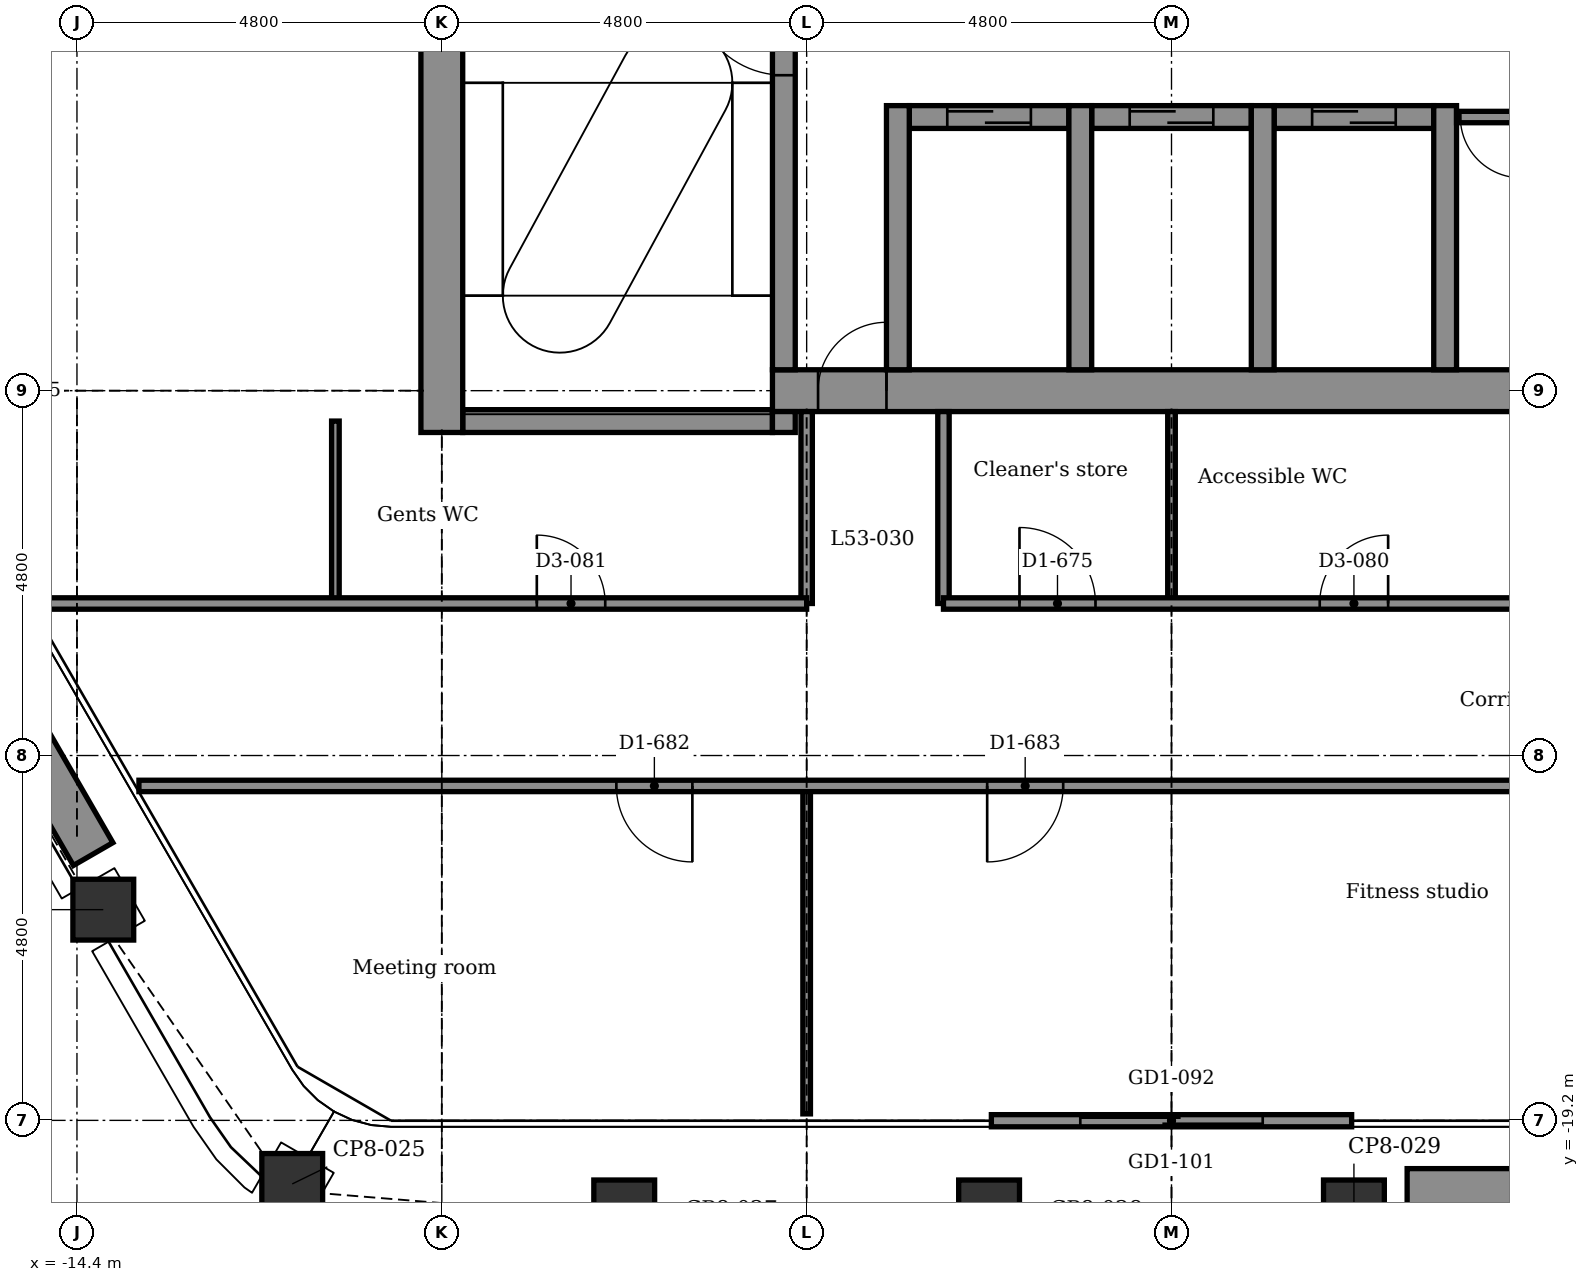
"""IFC4 building model, lengths in metres.
Left out: names, types, materials, properties, quantities, classifications, styles, units other than length and angle.
Written with IfcOpenShell. Run it as: python <this file> out.ifc"""

import sys

from ifc_helpers import new_model, si_unit, direction, frame, frame_2d, origin, origin_2d, place, context, subcontext, project, spatial, rectangle, extrude, element, fill, save


model = new_model("IFC4")
c1 = context("Model", 3, precision=1e-05, world=origin(), true_north=direction((0.0, 1.0)))
c2 = subcontext(c1, "Body", "Model", "MODEL_VIEW")
j1 = project(units=[si_unit("LENGTHUNIT", "METRE"), si_unit("PLANEANGLEUNIT", "RADIAN")], contexts=[c1])
p1 = place(None, origin())
s1 = spatial("IfcSite", under=j1, at=p1, CompositionType="ELEMENT")
p2 = place(p1, origin())
s2 = spatial("IfcBuilding", under=s1, at=p2, CompositionType="ELEMENT")
p3 = place(p2, frame((0.0, 0.0, 242.3)))
s3 = spatial("IfcBuildingStorey", under=s2, at=p3, CompositionType="ELEMENT", Elevation=242.3)
for number, where, z_axis, x_axis in (
    (1, (2.4, -20.385, -0.15), (0.0, 0.0, 1.0), (1.0, 0.0, 0.0)),
    (2, (-2.4, -20.385, -0.15), (0.0, 0.0, 1.0), (1.0, 0.0, 0.0)),
    (3, (-7.2, -20.385, -0.15), (0.0, 0.0, 1.0), (1.0, 0.0, 0.0)),
    (4, (-11.568, -20.036, -0.15), (0.0, 0.0, 1.0), (0.5, 0.866, 0.0)),
    (5, (-14.054, -16.428, -0.15), (0.0, 0.0, 1.0), (0.866, 0.5, 0.0)),
):
    element("IfcColumn", number, at=place(p3, frame(where, z_axis=z_axis, x_axis=x_axis)), inside=s3, PredefinedType="COLUMN", context=c2, shape_type="SweptSolid", body=[
        extrude(rectangle(XDim=0.8, YDim=0.8, at=origin_2d()), origin(), (0.0, 0.0, 1.0), 3.9),
    ])
p4 = place(p3, frame((-9.325, -10.0, -0.15), z_axis=(0.0, 0.0, 1.0), x_axis=(1.0, 0.0, 0.0)))
e6 = element("IfcWall", 6, at=p4, inside=s3, PredefinedType="STANDARD", context=c2, shape_type="SweptSolid", body=[
    extrude(rectangle(XDim=4.075, YDim=0.3, at=frame_2d((2.038, 0.0))), origin(), (0.0, 0.0, 1.0), 3.9),
])
p5 = place(p3, frame((-5.25, -9.6, -0.15), z_axis=(0.0, 0.0, 1.0), x_axis=(1.0, 0.0, 0.0)))
e7 = element("IfcWall", 7, at=p5, inside=s3, PredefinedType="SHEAR", context=c2, shape_type="SweptSolid", body=[
    extrude(rectangle(XDim=10.2, YDim=0.55, at=frame_2d((5.1, 0.0))), origin(), (0.0, 0.0, 1.0), 3.9),
])
p6 = place(p5, frame((0.6, 0.0, 0.15)))
e8 = element("IfcOpeningElement", 8, at=p6, cuts=e7, PredefinedType="OPENING", context=c2, shape_type="SweptSolid", body=[
    extrude(rectangle(XDim=0.9, YDim=2.1, at=frame_2d((0.45, 1.05))), frame((0.0, 0.285, 0.0), z_axis=(0.0, -1.0, 0.0), x_axis=(1.0, 0.0, 0.0)), (0.0, 0.0, 1.0), 0.57),
])
p7 = place(p3, frame((-3.45, -6.0, -0.15), z_axis=(0.0, 0.0, 1.0), x_axis=(1.0, 0.0, 0.0)))
e9 = element("IfcWall", 9, at=p7, inside=s3, PredefinedType="STANDARD", context=c2, shape_type="SweptSolid", body=[
    extrude(rectangle(XDim=2.1, YDim=0.3, at=frame_2d((1.05, 0.0))), origin(), (0.0, 0.0, 1.0), 3.9),
])
p8 = place(p7, frame((0.5, 0.0, 0.15)))
e10 = element("IfcOpeningElement", 10, at=p8, cuts=e9, PredefinedType="OPENING", context=c2, shape_type="SweptSolid", body=[
    extrude(rectangle(XDim=1.1, YDim=2.1, at=frame_2d((0.55, 1.05))), frame((0.0, 0.16, 0.0), z_axis=(0.0, -1.0, 0.0), x_axis=(1.0, 0.0, 0.0)), (0.0, 0.0, 1.0), 0.32),
])
p9 = place(p3, frame((-1.05, -6.0, -0.15), z_axis=(0.0, 0.0, 1.0), x_axis=(1.0, 0.0, 0.0)))
e11 = element("IfcWall", 11, at=p9, inside=s3, PredefinedType="STANDARD", context=c2, shape_type="SweptSolid", body=[
    extrude(rectangle(XDim=2.1, YDim=0.3, at=frame_2d((1.05, 0.0))), origin(), (0.0, 0.0, 1.0), 3.9),
])
p10 = place(p9, frame((0.5, 0.0, 0.15)))
e12 = element("IfcOpeningElement", 12, at=p10, cuts=e11, PredefinedType="OPENING", context=c2, shape_type="SweptSolid", body=[
    extrude(rectangle(XDim=1.1, YDim=2.1, at=frame_2d((0.55, 1.05))), frame((0.0, 0.16, 0.0), z_axis=(0.0, -1.0, 0.0), x_axis=(1.0, 0.0, 0.0)), (0.0, 0.0, 1.0), 0.32),
])
p11 = place(p3, frame((1.35, -6.0, -0.15), z_axis=(0.0, 0.0, 1.0), x_axis=(1.0, 0.0, 0.0)))
e13 = element("IfcWall", 13, at=p11, inside=s3, PredefinedType="STANDARD", context=c2, shape_type="SweptSolid", body=[
    extrude(rectangle(XDim=2.1, YDim=0.3, at=frame_2d((1.05, 0.0))), origin(), (0.0, 0.0, 1.0), 3.9),
])
p12 = place(p11, frame((0.5, 0.0, 0.15)))
e14 = element("IfcOpeningElement", 14, at=p12, cuts=e13, PredefinedType="OPENING", context=c2, shape_type="SweptSolid", body=[
    extrude(rectangle(XDim=1.1, YDim=2.1, at=frame_2d((0.55, 1.05))), frame((0.0, 0.16, 0.0), z_axis=(0.0, -1.0, 0.0), x_axis=(1.0, 0.0, 0.0)), (0.0, 0.0, 1.0), 0.32),
])
p13 = place(p3, frame((-9.6, -10.15, -0.15), z_axis=(0.0, 0.0, 1.0), x_axis=(0.0, 1.0, 0.0)))
e15 = element("IfcWall", 15, at=p13, inside=s3, PredefinedType="SHEAR", context=c2, shape_type="SweptSolid", body=[
    extrude(rectangle(XDim=7.6, YDim=0.55, at=frame_2d((3.8, 0.0))), origin(), (0.0, 0.0, 1.0), 3.9),
])
p14 = place(p3, frame((-5.1, -10.15, -0.15), z_axis=(0.0, 0.0, 1.0), x_axis=(0.0, 1.0, 0.0)))
e16 = element("IfcWall", 16, at=p14, inside=s3, PredefinedType="STANDARD", context=c2, shape_type="SweptSolid", body=[
    extrude(rectangle(XDim=0.275, YDim=0.3, at=frame_2d((0.137, 0.0))), origin(), (0.0, 0.0, 1.0), 3.9),
])
p15 = place(p3, frame((-5.1, -9.325, -0.15), z_axis=(0.0, 0.0, 1.0), x_axis=(0.0, 1.0, 0.0)))
e17 = element("IfcWall", 17, at=p15, inside=s3, PredefinedType="STANDARD", context=c2, shape_type="SweptSolid", body=[
    extrude(rectangle(XDim=7.075, YDim=0.3, at=frame_2d((3.538, 0.0))), origin(), (0.0, 0.0, 1.0), 3.9),
])
p16 = place(p15, frame((3.875, 0.0, 0.15)))
e18 = element("IfcOpeningElement", 18, at=p16, cuts=e17, PredefinedType="OPENING", context=c2, shape_type="SweptSolid", body=[
    extrude(rectangle(XDim=1.2, YDim=2.1, at=frame_2d((0.6, 1.05))), frame((0.0, 0.16, 0.0), z_axis=(0.0, -1.0, 0.0), x_axis=(1.0, 0.0, 0.0)), (0.0, 0.0, 1.0), 0.32),
])
for number, where, z_axis, x_axis in (
    (19, (-3.6, -9.325, -0.15), (0.0, 0.0, 1.0), (0.0, 1.0, 0.0)),
    (20, (-1.2, -9.325, -0.15), (0.0, 0.0, 1.0), (0.0, 1.0, 0.0)),
    (21, (1.2, -9.325, -0.15), (0.0, 0.0, 1.0), (0.0, 1.0, 0.0)),
    (22, (3.6, -9.325, -0.15), (0.0, 0.0, 1.0), (0.0, 1.0, 0.0)),
):
    element("IfcWall", number, at=place(p3, frame(where, z_axis=z_axis, x_axis=x_axis)), inside=s3, PredefinedType="STANDARD", context=c2, shape_type="SweptSolid", body=[
        extrude(rectangle(XDim=3.475, YDim=0.3, at=frame_2d((1.737, 0.0))), origin(), (0.0, 0.0, 1.0), 3.9),
    ])
p17 = place(p3, frame((2.37, -19.205, 0.0), z_axis=(0.0, 0.0, 1.0), x_axis=(-1.0, 0.0, 0.0)))
e23 = element("IfcWall", 23, at=p17, inside=s3, PredefinedType="PARTITIONING", context=c2, shape_type="SweptSolid", body=[
    extrude(rectangle(XDim=4.74, YDim=0.16, at=frame_2d((2.37, 0.0))), origin(), (0.0, 0.0, 1.0), 3.75),
])
p18 = place(p17, frame((1.17, 0.0, 0.0)))
e24 = element("IfcOpeningElement", 24, at=p18, cuts=e23, PredefinedType="OPENING", context=c2, shape_type="SweptSolid", body=[
    extrude(rectangle(XDim=2.4, YDim=2.4, at=frame_2d((1.2, 1.2))), frame((0.0, 0.09, 0.0), z_axis=(0.0, -1.0, 0.0), x_axis=(1.0, 0.0, 0.0)), (0.0, 0.0, 1.0), 0.18),
])
p19 = place(p3, frame((6.5, -20.135, 0.0), z_axis=(0.0, 0.0, 1.0), x_axis=(-1.0, 0.0, 0.0)))
e25 = element("IfcWall", 25, at=p19, inside=s3, PredefinedType="USERDEFINED", context=c2, shape_type="SweptSolid", body=[
    extrude(rectangle(XDim=3.4, YDim=0.6, at=frame_2d((1.7, 0.0))), origin(), (0.0, 0.0, 1.0), 0.7),
])
p20 = place(p3, frame((-14.187, -15.697, 0.0), z_axis=(0.0, 0.0, 1.0), x_axis=(-0.499977295307, 0.866038511948, 0.0)))
e26 = element("IfcWall", 26, at=p20, inside=s3, PredefinedType="USERDEFINED", context=c2, shape_type="SweptSolid", body=[
    extrude(rectangle(XDim=3.4, YDim=0.6, at=frame_2d((1.7, 0.0))), origin(), (0.0, 0.0, 1.0), 0.7),
])
p21 = place(p3, frame((0.0, -12.4, 0.0), z_axis=(0.0, 0.0, 1.0), x_axis=(0.0, 1.0, 0.0)))
e27 = element("IfcWall", 27, at=p21, inside=s3, PredefinedType="PARTITIONING", context=c2, shape_type="SweptSolid", body=[
    extrude(rectangle(XDim=2.525, YDim=0.1, at=frame_2d((1.262, 0.0))), origin(), (0.0, 0.0, 1.0), 3.217),
])
p22 = place(p3, frame((-3.0, -12.4, 0.0), z_axis=(0.0, 0.0, 1.0), x_axis=(0.0, 1.0, 0.0)))
e28 = element("IfcWall", 28, at=p22, inside=s3, PredefinedType="PARTITIONING", context=c2, shape_type="SweptSolid", body=[
    extrude(rectangle(XDim=2.525, YDim=0.15, at=frame_2d((1.262, 0.0))), origin(), (0.0, 0.0, 1.0), 3.75),
])
p23 = place(p3, frame((-4.8, -19.115, 0.0), z_axis=(0.0, 0.0, 1.0), x_axis=(0.0, 1.0, 0.0)))
e29 = element("IfcWall", 29, at=p23, inside=s3, PredefinedType="PARTITIONING", context=c2, shape_type="SweptSolid", body=[
    extrude(rectangle(XDim=4.314, YDim=0.1, at=frame_2d((2.157, 0.0))), origin(), (0.0, 0.0, 1.0), 3.217),
])
p24 = place(p3, frame((-4.8, -12.4, 0.0), z_axis=(0.0, 0.0, 1.0), x_axis=(0.0, 1.0, 0.0)))
e30 = element("IfcWall", 30, at=p24, inside=s3, PredefinedType="PARTITIONING", context=c2, shape_type="SweptSolid", body=[
    extrude(rectangle(XDim=2.525, YDim=0.15, at=frame_2d((1.262, 0.0))), origin(), (0.0, 0.0, 1.0), 3.217),
])
p25 = place(p3, frame((-11.0, -12.4, 0.0), z_axis=(0.0, 0.0, 1.0), x_axis=(0.0, 1.0, 0.0)))
e31 = element("IfcWall", 31, at=p25, inside=s3, PredefinedType="PARTITIONING", context=c2, shape_type="SweptSolid", body=[
    extrude(rectangle(XDim=2.4, YDim=0.1, at=frame_2d((1.2, 0.0))), origin(), (0.0, 0.0, 1.0), 3.75),
])
p26 = place(p3, frame((-13.585, -14.8, 0.0), z_axis=(0.0, 0.0, 1.0), x_axis=(1.0, 0.0, 0.0)))
e32 = element("IfcWall", 32, at=p26, inside=s3, PredefinedType="PARTITIONING", context=c2, shape_type="SweptSolid", body=[
    extrude(rectangle(XDim=27.169, YDim=0.15, at=frame_2d((13.585, 0.0))), origin(), (0.0, 0.0, 1.0), 3.75),
])
p27 = place(p26, frame((6.281, 0.0, 0.0)))
e33 = element("IfcOpeningElement", 33, at=p27, cuts=e32, PredefinedType="OPENING", context=c2, shape_type="SweptSolid", body=[
    extrude(rectangle(XDim=1.0, YDim=2.1, at=frame_2d((0.5, 1.05))), frame((0.0, 0.085, 0.0), z_axis=(0.0, -1.0, 0.0), x_axis=(1.0, 0.0, 0.0)), (0.0, 0.0, 1.0), 0.17),
])
p28 = place(p26, frame((11.16, 0.0, 0.0)))
e34 = element("IfcOpeningElement", 34, at=p28, cuts=e32, PredefinedType="OPENING", context=c2, shape_type="SweptSolid", body=[
    extrude(rectangle(XDim=1.0, YDim=2.1, at=frame_2d((0.5, 1.05))), frame((0.0, 0.085, 0.0), z_axis=(0.0, -1.0, 0.0), x_axis=(1.0, 0.0, 0.0)), (0.0, 0.0, 1.0), 0.17),
])
p29 = place(p26, frame((20.285, 0.0, 0.0)))
e35 = element("IfcOpeningElement", 35, at=p29, cuts=e32, PredefinedType="OPENING", context=c2, shape_type="SweptSolid", body=[
    extrude(rectangle(XDim=1.0, YDim=2.1, at=frame_2d((0.5, 1.05))), frame((0.0, 0.085, 0.0), z_axis=(0.0, -1.0, 0.0), x_axis=(1.0, 0.0, 0.0)), (0.0, 0.0, 1.0), 0.17),
])
p30 = place(p26, frame((24.368, 0.0, 0.0)))
e36 = element("IfcOpeningElement", 36, at=p30, cuts=e32, PredefinedType="OPENING", context=c2, shape_type="SweptSolid", body=[
    extrude(rectangle(XDim=1.0, YDim=2.1, at=frame_2d((0.5, 1.05))), frame((0.0, 0.085, 0.0), z_axis=(0.0, -1.0, 0.0), x_axis=(1.0, 0.0, 0.0)), (0.0, 0.0, 1.0), 0.17),
])
p31 = place(p3, frame((-14.97, -12.4, 0.0), z_axis=(0.0, 0.0, 1.0), x_axis=(1.0, 0.0, 0.0)))
e37 = element("IfcWall", 37, at=p31, inside=s3, PredefinedType="PARTITIONING", context=c2, shape_type="SweptSolid", body=[
    extrude(rectangle(XDim=10.17, YDim=0.15, at=frame_2d((5.085, 0.0))), origin(), (0.0, 0.0, 1.0), 3.75),
])
p32 = place(p31, frame((6.62, 0.0, 0.0)))
e38 = element("IfcOpeningElement", 38, at=p32, cuts=e37, PredefinedType="OPENING", context=c2, shape_type="SweptSolid", body=[
    extrude(rectangle(XDim=0.9, YDim=2.1, at=frame_2d((0.45, 1.05))), frame((0.0, 0.085, 0.0), z_axis=(0.0, -1.0, 0.0), x_axis=(1.0, 0.0, 0.0)), (0.0, 0.0, 1.0), 0.17),
])
p33 = place(p3, frame((-3.0, -12.4, 0.0), z_axis=(0.0, 0.0, 1.0), x_axis=(1.0, 0.0, 0.0)))
e39 = element("IfcWall", 39, at=p33, inside=s3, PredefinedType="PARTITIONING", context=c2, shape_type="SweptSolid", body=[
    extrude(rectangle(XDim=17.97, YDim=0.15, at=frame_2d((8.985, 0.0))), origin(), (0.0, 0.0, 1.0), 3.75),
])
p34 = place(p33, frame((1.0, 0.0, 0.0)))
e40 = element("IfcOpeningElement", 40, at=p34, cuts=e39, PredefinedType="OPENING", context=c2, shape_type="SweptSolid", body=[
    extrude(rectangle(XDim=1.0, YDim=2.1, at=frame_2d((0.5, 1.05))), frame((0.0, 0.085, 0.0), z_axis=(0.0, -1.0, 0.0), x_axis=(1.0, 0.0, 0.0)), (0.0, 0.0, 1.0), 0.17),
])
p35 = place(p33, frame((4.95, 0.0, 0.0)))
e41 = element("IfcOpeningElement", 41, at=p35, cuts=e39, PredefinedType="OPENING", context=c2, shape_type="SweptSolid", body=[
    extrude(rectangle(XDim=0.9, YDim=2.1, at=frame_2d((0.45, 1.05))), frame((0.0, 0.085, 0.0), z_axis=(0.0, -1.0, 0.0), x_axis=(1.0, 0.0, 0.0)), (0.0, 0.0, 1.0), 0.17),
])
p36 = place(p33, frame((9.7, 0.0, 0.0)))
e42 = element("IfcOpeningElement", 42, at=p36, cuts=e39, PredefinedType="OPENING", context=c2, shape_type="SweptSolid", body=[
    extrude(rectangle(XDim=1.0, YDim=2.1, at=frame_2d((0.5, 1.05))), frame((0.0, 0.085, 0.0), z_axis=(0.0, -1.0, 0.0), x_axis=(1.0, 0.0, 0.0)), (0.0, 0.0, 1.0), 0.17),
])
p37 = place(p3, frame((3.75, -6.0, 0.0), z_axis=(0.0, 0.0, 1.0), x_axis=(1.0, 0.0, 0.0)))
e43 = element("IfcWall", 43, at=p37, inside=s3, PredefinedType="PARTITIONING", context=c2, shape_type="SweptSolid", body=[
    extrude(rectangle(XDim=0.9, YDim=0.15, at=frame_2d((0.45, 0.0))), origin(), (0.0, 0.0, 1.0), 3.75),
])
p38 = place(p37, frame((0.05, 0.0, 0.0)))
e44 = element("IfcOpeningElement", 44, at=p38, cuts=e43, PredefinedType="OPENING", context=c2, shape_type="SweptSolid", body=[
    extrude(rectangle(XDim=0.8, YDim=2.1, at=frame_2d((0.4, 1.05))), frame((0.0, 0.085, 0.0), z_axis=(0.0, -1.0, 0.0), x_axis=(1.0, 0.0, 0.0)), (0.0, 0.0, 1.0), 0.17),
])
p39 = place(p18, origin())
e45 = element("IfcDoor", 45, at=p39, inside=s3, OperationType="DOUBLE_DOOR_SLIDING", PredefinedType="DOOR", context=c2, shape_type="SweptSolid", body=[
    extrude(rectangle(XDim=2.4, YDim=2.4, at=frame_2d((1.2, 1.2))), frame((0.0, 0.025, 0.0), z_axis=(0.0, -1.0, 0.0), x_axis=(1.0, 0.0, 0.0)), (0.0, 0.0, 1.0), 0.05),
])
fill(e24, e45)
p40 = place(p38, frame((0.8, 0.0, 0.0), z_axis=(0.0, 0.0, 1.0), x_axis=(-1.0, 0.0, 0.0)))
e46 = element("IfcDoor", 46, at=p40, inside=s3, OperationType="SINGLE_SWING_RIGHT", PredefinedType="DOOR", context=c2, shape_type="SweptSolid", body=[
    extrude(rectangle(XDim=0.8, YDim=2.1, at=frame_2d((0.4, 1.05))), frame((0.0, 0.025, 0.0), z_axis=(0.0, -1.0, 0.0), x_axis=(1.0, 0.0, 0.0)), (0.0, 0.0, 1.0), 0.05),
])
fill(e44, e46)
p41 = place(p34, origin())
e47 = element("IfcDoor", 47, at=p41, inside=s3, OperationType="SINGLE_SWING_LEFT", PredefinedType="DOOR", context=c2, shape_type="SweptSolid", body=[
    extrude(rectangle(XDim=1.0, YDim=2.1, at=frame_2d((0.5, 1.05))), frame((0.0, 0.025, 0.0), z_axis=(0.0, -1.0, 0.0), x_axis=(1.0, 0.0, 0.0)), (0.0, 0.0, 1.0), 0.05),
])
fill(e40, e47)
p42 = place(p35, origin())
e48 = element("IfcDoor", 48, at=p42, inside=s3, OperationType="SINGLE_SWING_RIGHT", PredefinedType="DOOR", context=c2, shape_type="SweptSolid", body=[
    extrude(rectangle(XDim=0.9, YDim=2.1, at=frame_2d((0.45, 1.05))), frame((0.0, 0.025, 0.0), z_axis=(0.0, -1.0, 0.0), x_axis=(1.0, 0.0, 0.0)), (0.0, 0.0, 1.0), 0.05),
])
fill(e41, e48)
p43 = place(p32, origin())
e49 = element("IfcDoor", 49, at=p43, inside=s3, OperationType="SINGLE_SWING_LEFT", PredefinedType="DOOR", context=c2, shape_type="SweptSolid", body=[
    extrude(rectangle(XDim=0.9, YDim=2.1, at=frame_2d((0.45, 1.05))), frame((0.0, 0.025, 0.0), z_axis=(0.0, -1.0, 0.0), x_axis=(1.0, 0.0, 0.0)), (0.0, 0.0, 1.0), 0.05),
])
fill(e38, e49)
p44 = place(p27, frame((1.0, 0.0, 0.0), z_axis=(0.0, 0.0, 1.0), x_axis=(-1.0, 0.0, 0.0)))
e50 = element("IfcDoor", 50, at=p44, inside=s3, OperationType="SINGLE_SWING_RIGHT", PredefinedType="DOOR", context=c2, shape_type="SweptSolid", body=[
    extrude(rectangle(XDim=1.0, YDim=2.1, at=frame_2d((0.5, 1.05))), frame((0.0, 0.025, 0.0), z_axis=(0.0, -1.0, 0.0), x_axis=(1.0, 0.0, 0.0)), (0.0, 0.0, 1.0), 0.05),
])
fill(e33, e50)
p45 = place(p28, frame((1.0, 0.0, 0.0), z_axis=(0.0, 0.0, 1.0), x_axis=(-1.0, 0.0, 0.0)))
e51 = element("IfcDoor", 51, at=p45, inside=s3, OperationType="SINGLE_SWING_LEFT", PredefinedType="DOOR", context=c2, shape_type="SweptSolid", body=[
    extrude(rectangle(XDim=1.0, YDim=2.1, at=frame_2d((0.5, 1.05))), frame((0.0, 0.025, 0.0), z_axis=(0.0, -1.0, 0.0), x_axis=(1.0, 0.0, 0.0)), (0.0, 0.0, 1.0), 0.05),
])
fill(e34, e51)
p46 = place(p8, origin())
e52 = element("IfcDoor", 52, at=p46, inside=s3, OperationType="DOUBLE_DOOR_SLIDING", PredefinedType="DOOR", context=c2, shape_type="SweptSolid", body=[
    extrude(rectangle(XDim=1.1, YDim=2.1, at=frame_2d((0.55, 1.05))), frame((0.0, 0.025, 0.0), z_axis=(0.0, -1.0, 0.0), x_axis=(1.0, 0.0, 0.0)), (0.0, 0.0, 1.0), 0.05),
])
fill(e10, e52)
p47 = place(p10, origin())
e53 = element("IfcDoor", 53, at=p47, inside=s3, OperationType="DOUBLE_DOOR_SLIDING", PredefinedType="DOOR", context=c2, shape_type="SweptSolid", body=[
    extrude(rectangle(XDim=1.1, YDim=2.1, at=frame_2d((0.55, 1.05))), frame((0.0, 0.025, 0.0), z_axis=(0.0, -1.0, 0.0), x_axis=(1.0, 0.0, 0.0)), (0.0, 0.0, 1.0), 0.05),
])
fill(e12, e53)
p48 = place(p12, origin())
e54 = element("IfcDoor", 54, at=p48, inside=s3, OperationType="DOUBLE_DOOR_SLIDING", PredefinedType="DOOR", context=c2, shape_type="SweptSolid", body=[
    extrude(rectangle(XDim=1.1, YDim=2.1, at=frame_2d((0.55, 1.05))), frame((0.0, 0.025, 0.0), z_axis=(0.0, -1.0, 0.0), x_axis=(1.0, 0.0, 0.0)), (0.0, 0.0, 1.0), 0.05),
])
fill(e14, e54)
p49 = place(p16, origin())
e55 = element("IfcDoor", 55, at=p49, inside=s3, OperationType="SINGLE_SWING_RIGHT", PredefinedType="DOOR", context=c2, shape_type="SweptSolid", body=[
    extrude(rectangle(XDim=1.2, YDim=2.1, at=frame_2d((0.6, 1.05))), frame((0.0, 0.025, 0.0), z_axis=(0.0, -1.0, 0.0), x_axis=(1.0, 0.0, 0.0)), (0.0, 0.0, 1.0), 0.05),
])
fill(e18, e55)
p50 = place(p6, origin())
e56 = element("IfcDoor", 56, at=p50, inside=s3, OperationType="SINGLE_SWING_RIGHT", PredefinedType="DOOR", context=c2, shape_type="SweptSolid", body=[
    extrude(rectangle(XDim=0.9, YDim=2.1, at=frame_2d((0.45, 1.05))), frame((0.0, 0.025, 0.0), z_axis=(0.0, -1.0, 0.0), x_axis=(1.0, 0.0, 0.0)), (0.0, 0.0, 1.0), 0.05),
])
fill(e8, e56)
save(model, sys.argv[1])
